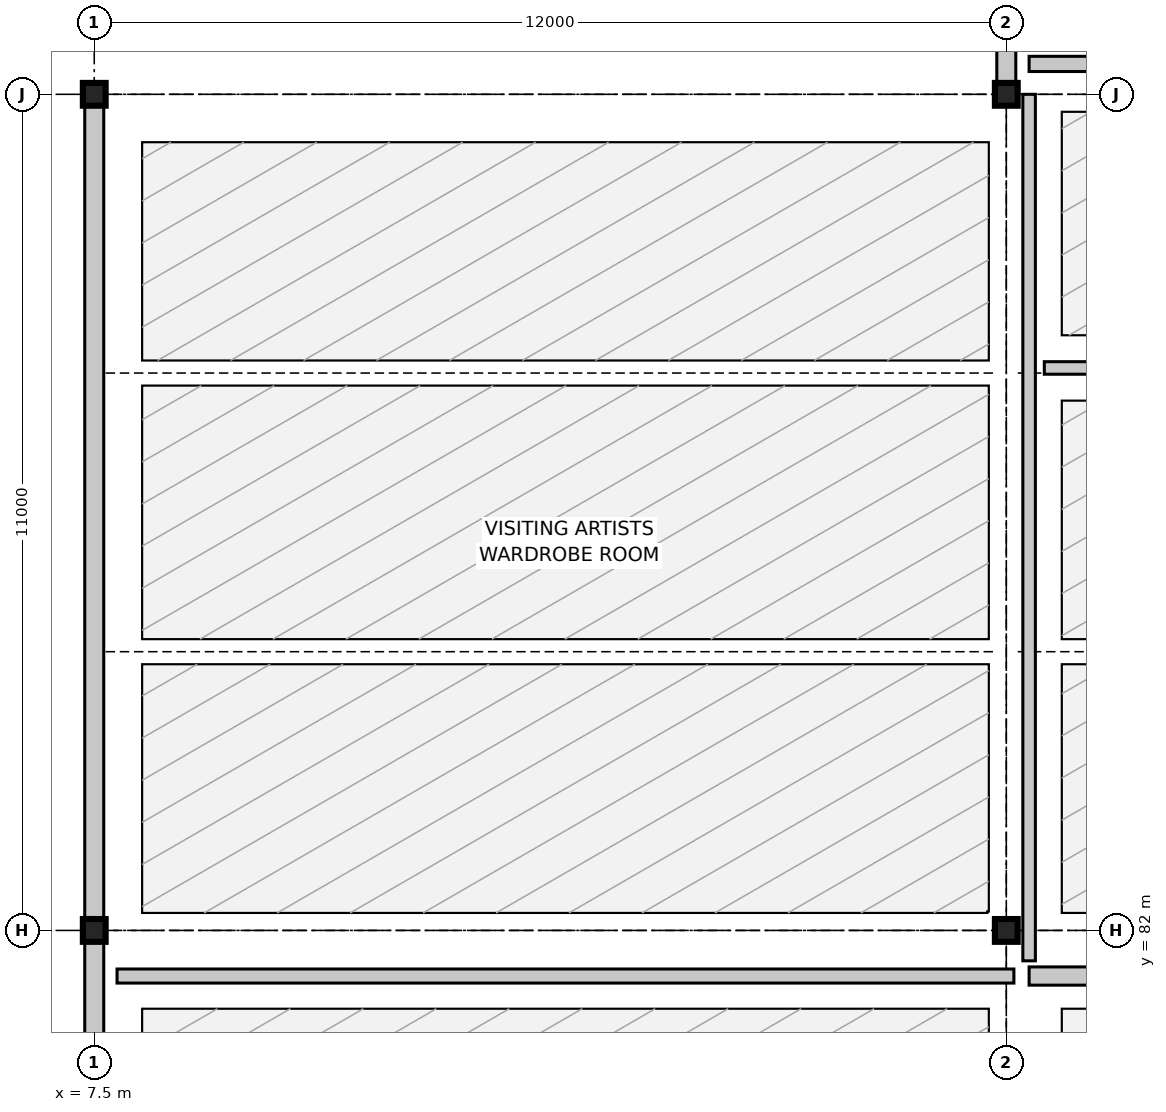
"""IFC4 building model, lengths in metres.
Left out: names, types, materials, properties, quantities, classifications, styles, units other than length and angle.
Written with IfcOpenShell. Run it as: python <this file> out.ifc"""

import sys

from ifc_helpers import new_model, si_unit, direction, frame, frame_2d, origin, origin_2d, place, context, subcontext, project, spatial, rectangle, i_section, extrude, element, fill, save


model = new_model("IFC4")
c1 = context("Model", 3, precision=1e-05, world=origin(), true_north=direction((0.0, 1.0)))
c2 = subcontext(c1, "Body", "Model", "MODEL_VIEW")
j1 = project(units=[si_unit("LENGTHUNIT", "METRE"), si_unit("PLANEANGLEUNIT", "RADIAN")], contexts=[c1])
p1 = place(None, origin())
s1 = spatial("IfcSite", under=j1, at=p1, CompositionType="ELEMENT")
p2 = place(p1, origin())
s2 = spatial("IfcBuilding", under=s1, at=p2, CompositionType="ELEMENT")
p3 = place(p2, frame((0.0, 0.0, 9.6)))
s3 = spatial("IfcBuildingStorey", under=s2, at=p3, CompositionType="ELEMENT", Elevation=9.6)
for number, where, z_axis, x_axis in (
    (1, (7.5, 82.0, 0.0), (0.0, 0.0, 1.0), (1.0, 0.0, 0.0)),
    (2, (7.5, 93.0, 0.0), (0.0, 0.0, 1.0), (1.0, 0.0, 0.0)),
    (3, (19.5, 82.0, 0.0), (0.0, 0.0, 1.0), (1.0, 0.0, 0.0)),
    (4, (19.5, 93.0, 0.0), (0.0, 0.0, 1.0), (1.0, 0.0, 0.0)),
):
    element("IfcColumn", number, at=place(p3, frame(where, z_axis=z_axis, x_axis=x_axis)), inside=s3, PredefinedType="COLUMN", context=c2, shape_type="SweptSolid", body=[
        extrude(i_section(OverallWidth=0.3, OverallDepth=0.3, WebThickness=0.011, FlangeThickness=0.019, FilletRadius=0.027, at=origin_2d()), origin(), (0.0, 0.0, 1.0), 4.8),
    ])
p4 = place(p3, frame((19.5, 93.02, 0.0), z_axis=(0.0, 0.0, 1.0), x_axis=(0.0, 1.0, 0.0)))
e5 = element("IfcWall", 5, at=p4, inside=s3, PredefinedType="SOLIDWALL", context=c2, shape_type="SweptSolid", body=[
    extrude(rectangle(XDim=10.96, YDim=0.25, at=frame_2d((5.48, 0.0))), origin(), (0.0, 0.0, 1.0), 4.088),
])
p5 = place(p4, frame((4.88, 0.0, 0.85)))
e6 = element("IfcOpeningElement", 6, at=p5, cuts=e5, PredefinedType="OPENING", context=c2, shape_type="SweptSolid", body=[
    extrude(rectangle(XDim=1.2, YDim=1.7, at=frame_2d((0.6, 0.85))), frame((0.0, 0.135, 0.0), z_axis=(0.0, -1.0, 0.0), x_axis=(1.0, 0.0, 0.0)), (0.0, 0.0, 1.0), 0.27),
])
p6 = place(p3, frame((7.5, 82.02, 0.0), z_axis=(0.0, 0.0, 1.0), x_axis=(0.0, 1.0, 0.0)))
e7 = element("IfcWall", 7, at=p6, inside=s3, PredefinedType="SOLIDWALL", context=c2, shape_type="SweptSolid", body=[
    extrude(rectangle(XDim=10.96, YDim=0.25, at=frame_2d((5.48, 0.0))), origin(), (0.0, 0.0, 1.0), 4.088),
])
p7 = place(p6, frame((4.78, 0.0, 0.85)))
e8 = element("IfcOpeningElement", 8, at=p7, cuts=e7, PredefinedType="OPENING", context=c2, shape_type="SweptSolid", body=[
    extrude(rectangle(XDim=1.4, YDim=1.7, at=frame_2d((0.7, 0.85))), frame((0.0, 0.135, 0.0), z_axis=(0.0, -1.0, 0.0), x_axis=(1.0, 0.0, 0.0)), (0.0, 0.0, 1.0), 0.27),
])
p8 = place(p3, frame((7.5, 71.02, 0.0), z_axis=(0.0, 0.0, 1.0), x_axis=(0.0, 1.0, 0.0)))
e9 = element("IfcWall", 9, at=p8, inside=s3, PredefinedType="SOLIDWALL", context=c2, shape_type="SweptSolid", body=[
    extrude(rectangle(XDim=10.96, YDim=0.25, at=frame_2d((5.48, 0.0))), origin(), (0.0, 0.0, 1.0), 4.088),
])
p9 = place(p8, frame((4.68, 0.0, 0.85)))
e10 = element("IfcOpeningElement", 10, at=p9, cuts=e9, PredefinedType="OPENING", context=c2, shape_type="SweptSolid", body=[
    extrude(rectangle(XDim=1.6, YDim=1.7, at=frame_2d((0.8, 0.85))), frame((0.0, 0.135, 0.0), z_axis=(0.0, -1.0, 0.0), x_axis=(1.0, 0.0, 0.0)), (0.0, 0.0, 1.0), 0.27),
])
p10 = place(p3, frame((19.8, 81.4, 0.0), z_axis=(0.0, 0.0, 1.0), x_axis=(1.0, 0.0, 0.0)))
e11 = element("IfcWall", 11, at=p10, inside=s3, PredefinedType="PARTITIONING", context=c2, shape_type="SweptSolid", body=[
    extrude(rectangle(XDim=15.2, YDim=0.24, at=frame_2d((7.6, 0.0))), origin(), (0.0, 0.0, 1.0), 3.89),
])
p11 = place(p10, frame((6.725, 0.0, 0.0)))
e12 = element("IfcOpeningElement", 12, at=p11, cuts=e11, PredefinedType="OPENING", context=c2, shape_type="SweptSolid", body=[
    extrude(rectangle(XDim=1.75, YDim=2.25, at=frame_2d((0.875, 1.125))), frame((0.0, 0.13, 0.0), z_axis=(0.0, -1.0, 0.0), x_axis=(1.0, 0.0, 0.0)), (0.0, 0.0, 1.0), 0.26),
])
p12 = place(p3, frame((7.8, 81.4, 0.0), z_axis=(0.0, 0.0, 1.0), x_axis=(1.0, 0.0, 0.0)))
e13 = element("IfcWall", 13, at=p12, inside=s3, PredefinedType="PARTITIONING", context=c2, shape_type="SweptSolid", body=[
    extrude(rectangle(XDim=11.8, YDim=0.185, at=frame_2d((5.9, 0.0))), origin(), (0.0, 0.0, 1.0), 4.09),
])
p13 = place(p12, frame((5.375, 0.0, 0.0)))
e14 = element("IfcOpeningElement", 14, at=p13, cuts=e13, PredefinedType="OPENING", context=c2, shape_type="SweptSolid", body=[
    extrude(rectangle(XDim=1.05, YDim=2.15, at=frame_2d((0.525, 1.075))), frame((0.0, 0.103, 0.0), z_axis=(0.0, -1.0, 0.0), x_axis=(1.0, 0.0, 0.0)), (0.0, 0.0, 1.0), 0.205),
])
p14 = place(p3, frame((19.8, 81.6, 0.0), z_axis=(0.0, 0.0, 1.0), x_axis=(0.0, 1.0, 0.0)))
e15 = element("IfcWall", 15, at=p14, inside=s3, PredefinedType="PARTITIONING", context=c2, shape_type="SweptSolid", body=[
    extrude(rectangle(XDim=11.4, YDim=0.165, at=frame_2d((5.7, 0.0))), origin(), (0.0, 0.0, 1.0), 4.09),
])
p15 = place(p14, frame((8.257, 0.0, 0.0)))
e16 = element("IfcOpeningElement", 16, at=p15, cuts=e15, PredefinedType="OPENING", context=c2, shape_type="SweptSolid", body=[
    extrude(rectangle(XDim=1.05, YDim=2.15, at=frame_2d((0.525, 1.075))), frame((0.0, 0.093, 0.0), z_axis=(0.0, -1.0, 0.0), x_axis=(1.0, 0.0, 0.0)), (0.0, 0.0, 1.0), 0.185),
])
p16 = place(p3, frame((20.0, 89.4, 0.0), z_axis=(0.0, 0.0, 1.0), x_axis=(1.0, 0.0, 0.0)))
e17 = element("IfcWall", 17, at=p16, inside=s3, PredefinedType="PARTITIONING", context=c2, shape_type="SweptSolid", body=[
    extrude(rectangle(XDim=15.0, YDim=0.165, at=frame_2d((7.5, 0.0))), origin(), (0.0, 0.0, 1.0), 4.09),
])
p17 = place(p16, frame((6.975, 0.0, 0.0)))
e18 = element("IfcOpeningElement", 18, at=p17, cuts=e17, PredefinedType="OPENING", context=c2, shape_type="SweptSolid", body=[
    extrude(rectangle(XDim=1.05, YDim=2.15, at=frame_2d((0.525, 1.075))), frame((0.0, 0.093, 0.0), z_axis=(0.0, -1.0, 0.0), x_axis=(1.0, 0.0, 0.0)), (0.0, 0.0, 1.0), 0.185),
])
p18 = place(p3, frame((19.8, 93.4, 0.0), z_axis=(0.0, 0.0, 1.0), x_axis=(1.0, 0.0, 0.0)))
e19 = element("IfcWall", 19, at=p18, inside=s3, PredefinedType="PARTITIONING", context=c2, shape_type="SweptSolid", body=[
    extrude(rectangle(XDim=15.2, YDim=0.2, at=frame_2d((7.6, 0.0))), origin(), (0.0, 0.0, 1.0), 4.09),
])
p19 = place(p18, frame((6.825, 0.0, 0.0)))
e20 = element("IfcOpeningElement", 20, at=p19, cuts=e19, PredefinedType="OPENING", context=c2, shape_type="SweptSolid", body=[
    extrude(rectangle(XDim=1.55, YDim=2.18, at=frame_2d((0.775, 1.09))), frame((0.0, 0.11, 0.0), z_axis=(0.0, -1.0, 0.0), x_axis=(1.0, 0.0, 0.0)), (0.0, 0.0, 1.0), 0.22),
])
p20 = place(p7, origin())
e21 = element("IfcWindow", 21, at=p20, inside=s3, PartitioningType="SINGLE_PANEL", PredefinedType="WINDOW", context=c2, shape_type="SweptSolid", body=[
    extrude(rectangle(XDim=1.4, YDim=1.7, at=frame_2d((0.7, 0.85))), frame((0.0, 0.03, 0.0), z_axis=(0.0, -1.0, 0.0), x_axis=(1.0, 0.0, 0.0)), (0.0, 0.0, 1.0), 0.06),
])
fill(e8, e21)
p21 = place(p13, origin())
e22 = element("IfcDoor", 22, at=p21, inside=s3, OperationType="SINGLE_SWING_LEFT", PredefinedType="DOOR", context=c2, shape_type="SweptSolid", body=[
    extrude(rectangle(XDim=1.05, YDim=2.15, at=frame_2d((0.525, 1.075))), frame((0.0, 0.025, 0.0), z_axis=(0.0, -1.0, 0.0), x_axis=(1.0, 0.0, 0.0)), (0.0, 0.0, 1.0), 0.05),
])
fill(e14, e22)
p22 = place(p15, origin())
e23 = element("IfcDoor", 23, at=p22, inside=s3, OperationType="SINGLE_SWING_RIGHT", PredefinedType="DOOR", context=c2, shape_type="SweptSolid", body=[
    extrude(rectangle(XDim=1.05, YDim=2.15, at=frame_2d((0.525, 1.075))), frame((0.0, 0.025, 0.0), z_axis=(0.0, -1.0, 0.0), x_axis=(1.0, 0.0, 0.0)), (0.0, 0.0, 1.0), 0.05),
])
fill(e16, e23)
save(model, sys.argv[1])
